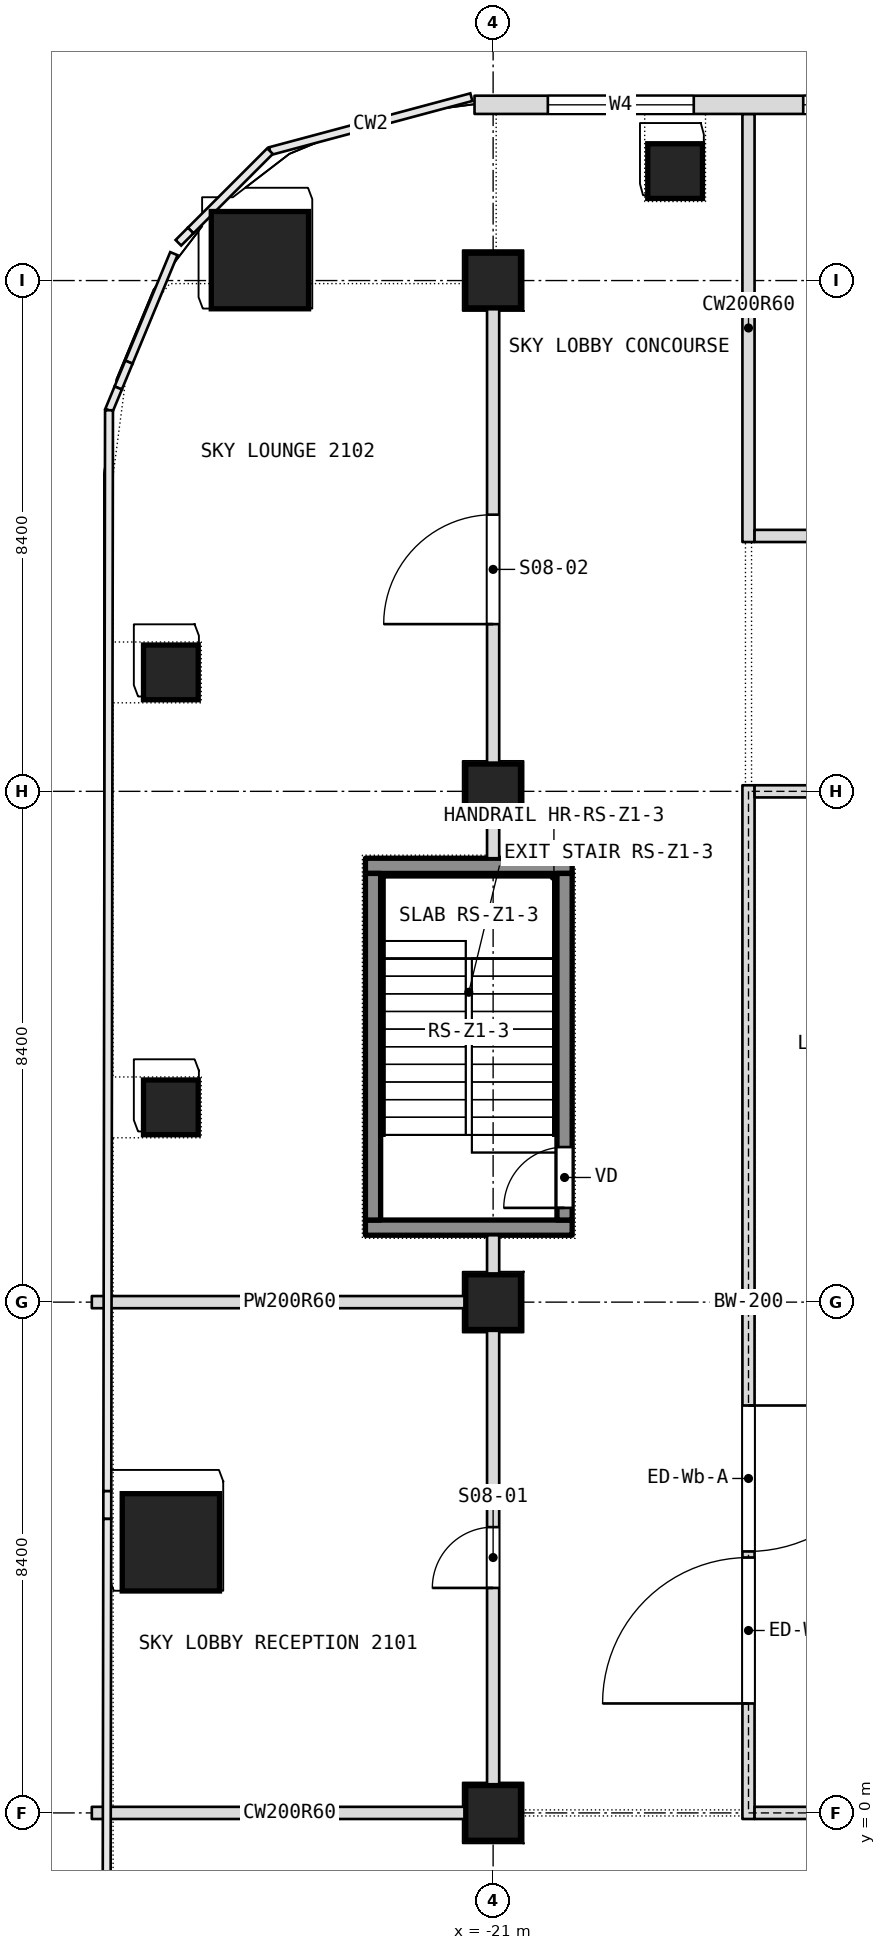
"""IFC4 building model, lengths in metres.
Left out: names, types, materials, properties, quantities, classifications, styles, units other than length and angle.
Written with IfcOpenShell. Run it as: python <this file> out.ifc"""

import sys

from ifc_helpers import new_model, si_unit, direction, frame, frame_2d, origin, origin_2d, place, context, subcontext, project, spatial, rectangle, extrude, element, fill, save


model = new_model("IFC4")
c1 = context("Model", 3, precision=1e-05, world=origin(), true_north=direction((0.0, 1.0)))
c2 = subcontext(c1, "Body", "Model", "MODEL_VIEW")
j1 = project(units=[si_unit("LENGTHUNIT", "METRE"), si_unit("PLANEANGLEUNIT", "RADIAN")], contexts=[c1])
p1 = place(None, origin())
s1 = spatial("IfcSite", under=j1, at=p1, CompositionType="ELEMENT")
p2 = place(p1, origin())
s2 = spatial("IfcBuilding", under=s1, at=p2, CompositionType="ELEMENT")
p3 = place(p2, frame((0.0, 0.0, 97.7)))
s3 = spatial("IfcBuildingStorey", under=s2, at=p3, CompositionType="ELEMENT", Elevation=97.7)
for number, where, z_axis, x_axis in (
    (1, (-24.835, 25.535, 0.0), (0.0, 0.0, 1.0), (1.0, 0.0, 0.0)),
    (2, (-26.3, 4.45, 0.0), (0.0, 0.0, 1.0), (1.0, 0.0, 0.0)),
):
    element("IfcColumn", number, at=place(p3, frame(where, z_axis=z_axis, x_axis=x_axis)), inside=s3, PredefinedType="COLUMN", context=c2, shape_type="SweptSolid", body=[
        extrude(rectangle(XDim=1.6, YDim=1.6, at=origin_2d()), origin(), (0.0, 0.0, 1.0), 7.2),
    ])
for number, where, z_axis, x_axis in (
    (3, (-21.0, 0.0, 0.0), (0.0, 0.0, 1.0), (1.0, 0.0, 0.0)),
    (4, (-21.0, 8.4, 0.0), (0.0, 0.0, 1.0), (1.0, 0.0, 0.0)),
    (5, (-21.0, 16.8, 0.0), (0.0, 0.0, 1.0), (1.0, 0.0, 0.0)),
    (6, (-21.0, 25.2, 0.0), (0.0, 0.0, 1.0), (1.0, 0.0, 0.0)),
    (7, (-26.3, 11.603, 0.0), (0.0, 0.0, 1.0), (1.0, 0.0, 0.0)),
    (8, (-26.3, 18.756, 0.0), (0.0, 0.0, 1.0), (1.0, 0.0, 0.0)),
    (9, (-18.007, 27.0, 0.0), (0.0, 0.0, 1.0), (1.0, 0.0, 0.0)),
):
    element("IfcColumn", number, at=place(p3, frame(where, z_axis=z_axis, x_axis=x_axis)), inside=s3, PredefinedType="COLUMN", context=c2, shape_type="SweptSolid", body=[
        extrude(rectangle(XDim=0.9, YDim=0.9, at=origin_2d()), origin(), (0.0, 0.0, 1.0), 7.2),
    ])
for number, where, z_axis, x_axis in (
    (10, (-27.6, 0.0, 0.0), (0.0, 0.0, 1.0), (1.0, 0.0, 0.0)),
    (11, (-27.6, 8.4, 0.0), (0.0, 0.0, 1.0), (1.0, 0.0, 0.0)),
):
    element("IfcWall", number, at=place(p3, frame(where, z_axis=z_axis, x_axis=x_axis)), inside=s3, PredefinedType="PARTITIONING", context=c2, shape_type="SweptSolid", body=[
        extrude(rectangle(XDim=6.5, YDim=0.2, at=frame_2d((3.25, 0.0))), origin(), (0.0, 0.0, 1.0), 6.49),
    ])
p4 = place(p3, frame((-16.8, 20.9, 0.0), z_axis=(0.0, 0.0, 1.0), x_axis=(0.0, 1.0, 0.0)))
e12 = element("IfcWall", 12, at=p4, inside=s3, PredefinedType="PARTITIONING", context=c2, shape_type="SweptSolid", body=[
    extrude(rectangle(XDim=7.04, YDim=0.2, at=frame_2d((3.52, 0.0))), origin(), (0.0, 0.0, 1.0), 6.94),
])
p5 = place(p3, frame((-21.0, -0.1, 0.0), z_axis=(0.0, 0.0, 1.0), x_axis=(0.0, 1.0, 0.0)))
e13 = element("IfcWall", 13, at=p5, inside=s3, PredefinedType="PARTITIONING", context=c2, shape_type="SweptSolid", body=[
    extrude(rectangle(XDim=9.6, YDim=0.2, at=frame_2d((4.8, 0.0))), origin(), (0.0, 0.0, 1.0), 6.94),
])
p6 = place(p5, frame((3.8, 0.0, 0.0)))
e14 = element("IfcOpeningElement", 14, at=p6, cuts=e13, PredefinedType="OPENING", context=c2, shape_type="SweptSolid", body=[
    extrude(rectangle(XDim=1.0, YDim=2.1, at=frame_2d((0.5, 1.05))), frame((0.0, 0.1, 0.0), z_axis=(0.0, -1.0, 0.0), x_axis=(1.0, 0.0, 0.0)), (0.0, 0.0, 1.0), 0.2),
])
p7 = place(p3, frame((-21.0, 15.7, 0.0), z_axis=(0.0, 0.0, 1.0), x_axis=(0.0, 1.0, 0.0)))
e15 = element("IfcWall", 15, at=p7, inside=s3, PredefinedType="PARTITIONING", context=c2, shape_type="SweptSolid", body=[
    extrude(rectangle(XDim=9.5, YDim=0.2, at=frame_2d((4.75, 0.0))), origin(), (0.0, 0.0, 1.0), 6.94),
])
p8 = place(p7, frame((3.85, 0.0, 0.0)))
e16 = element("IfcOpeningElement", 16, at=p8, cuts=e15, PredefinedType="OPENING", context=c2, shape_type="SweptSolid", body=[
    extrude(rectangle(XDim=1.8, YDim=2.1, at=frame_2d((0.9, 1.05))), frame((0.0, 0.1, 0.0), z_axis=(0.0, -1.0, 0.0), x_axis=(1.0, 0.0, 0.0)), (0.0, 0.0, 1.0), 0.2),
])
p9 = place(p3, frame((-16.7, 21.0, 0.0), z_axis=(0.0, 0.0, 1.0), x_axis=(1.0, 0.0, 0.0)))
e17 = element("IfcWall", 17, at=p9, inside=s3, PredefinedType="PARTITIONING", context=c2, shape_type="SweptSolid", body=[
    extrude(rectangle(XDim=19.6, YDim=0.2, at=frame_2d((9.8, 0.0))), origin(), (0.0, 0.0, 1.0), 6.94),
])
p10 = place(p9, frame((5.8, 0.0, 0.0)))
e18 = element("IfcOpeningElement", 18, at=p10, cuts=e17, PredefinedType="OPENING", context=c2, shape_type="SweptSolid", body=[
    extrude(rectangle(XDim=1.0, YDim=2.1, at=frame_2d((0.5, 1.05))), frame((0.0, 0.1, 0.0), z_axis=(0.0, -1.0, 0.0), x_axis=(1.0, 0.0, 0.0)), (0.0, 0.0, 1.0), 0.2),
])
p11 = place(p3, frame((21.306, 28.09, 0.0), z_axis=(0.0, 0.0, 1.0), x_axis=(-1.0, 0.0, 0.0)))
e19 = element("IfcWall", 19, at=p11, inside=s3, PredefinedType="NOTDEFINED", context=c2, shape_type="SweptSolid", body=[
    extrude(rectangle(XDim=42.612, YDim=0.3, at=frame_2d((21.306, 0.0))), origin(), (0.0, 0.0, 1.0), 7.2),
])
p12 = place(p11, frame((1.206, 0.0, 0.9)))
e20 = element("IfcOpeningElement", 20, at=p12, cuts=e19, PredefinedType="OPENING", context=c2, shape_type="SweptSolid", body=[
    extrude(rectangle(XDim=2.4, YDim=4.5, at=frame_2d((1.2, 2.25))), frame((0.0, 0.15, 0.0), z_axis=(0.0, -1.0, 0.0), x_axis=(1.0, 0.0, 0.0)), (0.0, 0.0, 1.0), 0.3),
])
p13 = place(p11, frame((5.406, 0.0, 0.9)))
e21 = element("IfcOpeningElement", 21, at=p13, cuts=e19, PredefinedType="OPENING", context=c2, shape_type="SweptSolid", body=[
    extrude(rectangle(XDim=2.4, YDim=4.5, at=frame_2d((1.2, 2.25))), frame((0.0, 0.15, 0.0), z_axis=(0.0, -1.0, 0.0), x_axis=(1.0, 0.0, 0.0)), (0.0, 0.0, 1.0), 0.3),
])
p14 = place(p11, frame((9.606, 0.0, 0.9)))
e22 = element("IfcOpeningElement", 22, at=p14, cuts=e19, PredefinedType="OPENING", context=c2, shape_type="SweptSolid", body=[
    extrude(rectangle(XDim=2.4, YDim=4.5, at=frame_2d((1.2, 2.25))), frame((0.0, 0.15, 0.0), z_axis=(0.0, -1.0, 0.0), x_axis=(1.0, 0.0, 0.0)), (0.0, 0.0, 1.0), 0.3),
])
p15 = place(p11, frame((13.806, 0.0, 0.9)))
e23 = element("IfcOpeningElement", 23, at=p15, cuts=e19, PredefinedType="OPENING", context=c2, shape_type="SweptSolid", body=[
    extrude(rectangle(XDim=2.4, YDim=4.5, at=frame_2d((1.2, 2.25))), frame((0.0, 0.15, 0.0), z_axis=(0.0, -1.0, 0.0), x_axis=(1.0, 0.0, 0.0)), (0.0, 0.0, 1.0), 0.3),
])
p16 = place(p11, frame((18.006, 0.0, 0.9)))
e24 = element("IfcOpeningElement", 24, at=p16, cuts=e19, PredefinedType="OPENING", context=c2, shape_type="SweptSolid", body=[
    extrude(rectangle(XDim=2.4, YDim=4.5, at=frame_2d((1.2, 2.25))), frame((0.0, 0.15, 0.0), z_axis=(0.0, -1.0, 0.0), x_axis=(1.0, 0.0, 0.0)), (0.0, 0.0, 1.0), 0.3),
])
p17 = place(p11, frame((22.206, 0.0, 0.9)))
e25 = element("IfcOpeningElement", 25, at=p17, cuts=e19, PredefinedType="OPENING", context=c2, shape_type="SweptSolid", body=[
    extrude(rectangle(XDim=2.4, YDim=4.5, at=frame_2d((1.2, 2.25))), frame((0.0, 0.15, 0.0), z_axis=(0.0, -1.0, 0.0), x_axis=(1.0, 0.0, 0.0)), (0.0, 0.0, 1.0), 0.3),
])
p18 = place(p11, frame((26.406, 0.0, 0.9)))
e26 = element("IfcOpeningElement", 26, at=p18, cuts=e19, PredefinedType="OPENING", context=c2, shape_type="SweptSolid", body=[
    extrude(rectangle(XDim=2.4, YDim=4.5, at=frame_2d((1.2, 2.25))), frame((0.0, 0.15, 0.0), z_axis=(0.0, -1.0, 0.0), x_axis=(1.0, 0.0, 0.0)), (0.0, 0.0, 1.0), 0.3),
])
p19 = place(p11, frame((30.606, 0.0, 0.9)))
e27 = element("IfcOpeningElement", 27, at=p19, cuts=e19, PredefinedType="OPENING", context=c2, shape_type="SweptSolid", body=[
    extrude(rectangle(XDim=2.4, YDim=4.5, at=frame_2d((1.2, 2.25))), frame((0.0, 0.15, 0.0), z_axis=(0.0, -1.0, 0.0), x_axis=(1.0, 0.0, 0.0)), (0.0, 0.0, 1.0), 0.3),
])
p20 = place(p11, frame((34.806, 0.0, 0.9)))
e28 = element("IfcOpeningElement", 28, at=p20, cuts=e19, PredefinedType="OPENING", context=c2, shape_type="SweptSolid", body=[
    extrude(rectangle(XDim=2.4, YDim=4.5, at=frame_2d((1.2, 2.25))), frame((0.0, 0.15, 0.0), z_axis=(0.0, -1.0, 0.0), x_axis=(1.0, 0.0, 0.0)), (0.0, 0.0, 1.0), 0.3),
])
p21 = place(p11, frame((39.006, 0.0, 0.9)))
e29 = element("IfcOpeningElement", 29, at=p21, cuts=e19, PredefinedType="OPENING", context=c2, shape_type="SweptSolid", body=[
    extrude(rectangle(XDim=2.4, YDim=4.5, at=frame_2d((1.2, 2.25))), frame((0.0, 0.15, 0.0), z_axis=(0.0, -1.0, 0.0), x_axis=(1.0, 0.0, 0.0)), (0.0, 0.0, 1.0), 0.3),
])
p22 = place(p3, frame((-16.8, -0.1, 0.0), z_axis=(0.0, 0.0, 1.0), x_axis=(0.0, 1.0, 0.0)))
e30 = element("IfcWall", 30, at=p22, inside=s3, PredefinedType="PARTITIONING", context=c2, shape_type="SweptSolid", body=[
    extrude(rectangle(XDim=17.0, YDim=0.2, at=frame_2d((8.5, 0.0))), origin(), (0.0, 0.0, 1.0), 6.94),
])
p23 = place(p22, frame((1.9, 0.0, 0.0)))
e31 = element("IfcOpeningElement", 31, at=p23, cuts=e30, PredefinedType="OPENING", context=c2, shape_type="SweptSolid", body=[
    extrude(rectangle(XDim=2.4, YDim=2.1, at=frame_2d((1.2, 1.05))), frame((0.0, 0.1, 0.0), z_axis=(0.0, -1.0, 0.0), x_axis=(1.0, 0.0, 0.0)), (0.0, 0.0, 1.0), 0.2),
])
p24 = place(p22, frame((4.4, 0.0, 0.0)))
e32 = element("IfcOpeningElement", 32, at=p24, cuts=e30, PredefinedType="OPENING", context=c2, shape_type="SweptSolid", body=[
    extrude(rectangle(XDim=2.4, YDim=2.1, at=frame_2d((1.2, 1.05))), frame((0.0, 0.1, 0.0), z_axis=(0.0, -1.0, 0.0), x_axis=(1.0, 0.0, 0.0)), (0.0, 0.0, 1.0), 0.2),
])
p25 = place(p3, frame((-16.7, 0.0, 0.0), z_axis=(0.0, 0.0, 1.0), x_axis=(1.0, 0.0, 0.0)))
e33 = element("IfcWall", 33, at=p25, inside=s3, PredefinedType="PARTITIONING", context=c2, shape_type="SweptSolid", body=[
    extrude(rectangle(XDim=4.6, YDim=0.2, at=frame_2d((2.3, 0.0))), origin(), (0.0, 0.0, 1.0), 6.49),
])
p26 = place(p25, frame((2.1, 0.0, 0.0)))
e34 = element("IfcOpeningElement", 34, at=p26, cuts=e33, PredefinedType="OPENING", context=c2, shape_type="SweptSolid", body=[
    extrude(rectangle(XDim=1.2, YDim=2.1, at=frame_2d((0.6, 1.05))), frame((0.0, 0.1, 0.0), z_axis=(0.0, -1.0, 0.0), x_axis=(1.0, 0.0, 0.0)), (0.0, 0.0, 1.0), 0.2),
])
p27 = place(p3, frame((-16.7, 16.8, 0.0), z_axis=(0.0, 0.0, 1.0), x_axis=(1.0, 0.0, 0.0)))
e35 = element("IfcWall", 35, at=p27, inside=s3, PredefinedType="PARTITIONING", context=c2, shape_type="SweptSolid", body=[
    extrude(rectangle(XDim=4.6, YDim=0.2, at=frame_2d((2.3, 0.0))), origin(), (0.0, 0.0, 1.0), 6.49),
])
for number, where, z_axis, x_axis in (
    (36, (-23.1, 9.625, 0.1), (0.0, 0.0, 1.0), (1.0, 0.0, 0.0)),
    (37, (-23.1, 15.575, 0.1), (0.0, 0.0, 1.0), (1.0, 0.0, 0.0)),
):
    element("IfcWall", number, at=place(p3, frame(where, z_axis=z_axis, x_axis=x_axis)), inside=s3, PredefinedType="SHEAR", context=c2, shape_type="SweptSolid", body=[
        extrude(rectangle(XDim=3.4, YDim=0.25, at=frame_2d((1.7, 0.0))), origin(), (0.0, 0.0, 1.0), 7.2),
    ])
p28 = place(p3, frame((-22.975, 9.75, 0.1), z_axis=(0.0, 0.0, 1.0), x_axis=(0.0, 1.0, 0.0)))
e38 = element("IfcWall", 38, at=p28, inside=s3, PredefinedType="SHEAR", context=c2, shape_type="SweptSolid", body=[
    extrude(rectangle(XDim=5.7, YDim=0.25, at=frame_2d((2.85, 0.0))), origin(), (0.0, 0.0, 1.0), 7.2),
])
p29 = place(p3, frame((-19.825, 9.75, 0.1), z_axis=(0.0, 0.0, 1.0), x_axis=(0.0, 1.0, 0.0)))
e39 = element("IfcWall", 39, at=p29, inside=s3, PredefinedType="SHEAR", context=c2, shape_type="SweptSolid", body=[
    extrude(rectangle(XDim=5.7, YDim=0.25, at=frame_2d((2.85, 0.0))), origin(), (0.0, 0.0, 1.0), 7.2),
])
p30 = place(p29, frame((0.2, 0.0, 0.0)))
e40 = element("IfcOpeningElement", 40, at=p30, cuts=e39, PredefinedType="OPENING", context=c2, shape_type="SweptSolid", body=[
    extrude(rectangle(XDim=1.0, YDim=2.1, at=frame_2d((0.5, 1.05))), frame((0.0, 0.125, 0.0), z_axis=(0.0, -1.0, 0.0), x_axis=(1.0, 0.0, 0.0)), (0.0, 0.0, 1.0), 0.25),
])
p31 = place(p6, origin())
e41 = element("IfcDoor", 41, at=p31, inside=s3, OperationType="SINGLE_SWING_LEFT", PredefinedType="DOOR", context=c2, shape_type="SweptSolid", body=[
    extrude(rectangle(XDim=1.0, YDim=2.1, at=frame_2d((0.5, 1.05))), frame((0.0, 0.025, 0.0), z_axis=(0.0, -1.0, 0.0), x_axis=(1.0, 0.0, 0.0)), (0.0, 0.0, 1.0), 0.05),
])
fill(e14, e41)
p32 = place(p8, origin())
e42 = element("IfcDoor", 42, at=p32, inside=s3, OperationType="DOUBLE_DOOR_SINGLE_SWING", PredefinedType="DOOR", context=c2, shape_type="SweptSolid", body=[
    extrude(rectangle(XDim=1.8, YDim=2.1, at=frame_2d((0.9, 1.05))), frame((0.0, 0.025, 0.0), z_axis=(0.0, -1.0, 0.0), x_axis=(1.0, 0.0, 0.0)), (0.0, 0.0, 1.0), 0.05),
])
fill(e16, e42)
p33 = place(p20, origin())
e43 = element("IfcWindow", 43, at=p33, inside=s3, PartitioningType="SINGLE_PANEL", PredefinedType="WINDOW", context=c2, shape_type="SweptSolid", body=[
    extrude(rectangle(XDim=2.4, YDim=4.5, at=frame_2d((1.2, 2.25))), frame((0.0, 0.03, 0.0), z_axis=(0.0, -1.0, 0.0), x_axis=(1.0, 0.0, 0.0)), (0.0, 0.0, 1.0), 0.06),
])
fill(e28, e43)
p34 = place(p21, origin())
e44 = element("IfcWindow", 44, at=p34, inside=s3, PartitioningType="SINGLE_PANEL", PredefinedType="WINDOW", context=c2, shape_type="SweptSolid", body=[
    extrude(rectangle(XDim=2.4, YDim=4.5, at=frame_2d((1.2, 2.25))), frame((0.0, 0.03, 0.0), z_axis=(0.0, -1.0, 0.0), x_axis=(1.0, 0.0, 0.0)), (0.0, 0.0, 1.0), 0.06),
])
fill(e29, e44)
p35 = place(p30, origin())
e45 = element("IfcDoor", 45, at=p35, inside=s3, OperationType="SINGLE_SWING_LEFT", PredefinedType="DOOR", context=c2, shape_type="SweptSolid", body=[
    extrude(rectangle(XDim=1.0, YDim=2.1, at=frame_2d((0.5, 1.05))), frame((0.0, 0.025, 0.0), z_axis=(0.0, -1.0, 0.0), x_axis=(1.0, 0.0, 0.0)), (0.0, 0.0, 1.0), 0.05),
])
fill(e40, e45)
p36 = place(p23, origin())
e46 = element("IfcDoor", 46, at=p36, inside=s3, OperationType="DOUBLE_DOOR_SINGLE_SWING", PredefinedType="DOOR", context=c2, shape_type="SweptSolid", body=[
    extrude(rectangle(XDim=2.4, YDim=2.1, at=frame_2d((1.2, 1.05))), frame((0.0, 0.025, 0.0), z_axis=(0.0, -1.0, 0.0), x_axis=(1.0, 0.0, 0.0)), (0.0, 0.0, 1.0), 0.05),
])
fill(e31, e46)
p37 = place(p24, origin())
e47 = element("IfcDoor", 47, at=p37, inside=s3, OperationType="DOUBLE_DOOR_SINGLE_SWING", PredefinedType="DOOR", context=c2, shape_type="SweptSolid", body=[
    extrude(rectangle(XDim=2.4, YDim=2.1, at=frame_2d((1.2, 1.05))), frame((0.0, 0.025, 0.0), z_axis=(0.0, -1.0, 0.0), x_axis=(1.0, 0.0, 0.0)), (0.0, 0.0, 1.0), 0.05),
])
fill(e32, e47)
save(model, sys.argv[1])
